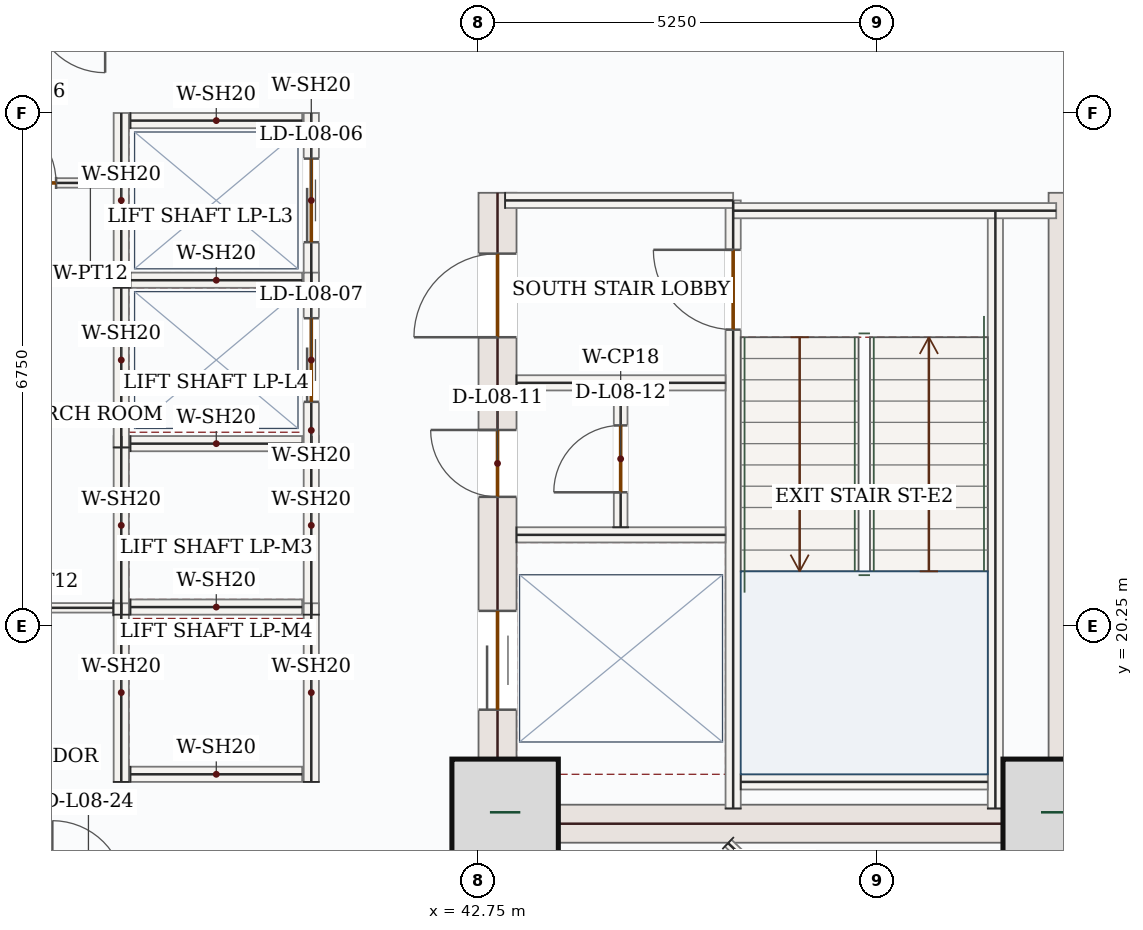
"""IFC4 building model, lengths in metres.
Left out: names, types, materials, properties, quantities, classifications, styles, units other than length and angle.
Written with IfcOpenShell. Run it as: python <this file> out.ifc"""

import sys

from ifc_helpers import new_model, si_unit, direction, frame, frame_2d, origin, origin_2d, place, context, subcontext, project, spatial, rectangle, extrude, source, transform, mapped, element, fill, save


model = new_model("IFC4")
c1 = context("Model", 3, precision=1e-05, world=origin(), true_north=direction((0.0, 1.0)))
c2 = subcontext(c1, "Body", "Model", "MODEL_VIEW")
j1 = project(units=[si_unit("LENGTHUNIT", "METRE"), si_unit("PLANEANGLEUNIT", "RADIAN")], contexts=[c1])
p1 = place(None, origin())
s1 = spatial("IfcSite", under=j1, at=p1, CompositionType="ELEMENT")
p2 = place(p1, origin())
s2 = spatial("IfcBuilding", under=s1, at=p2, CompositionType="ELEMENT")
p3 = place(p2, frame((0.0, 0.0, 41.7)))
s3 = spatial("IfcBuildingStorey", under=s2, at=p3, CompositionType="ELEMENT", Elevation=41.7)
p4 = place(p3, frame((43.0, 17.4, 0.0), z_axis=(0.0, 0.0, 1.0), x_axis=(0.0, 1.0, 0.0)))
e1 = element("IfcWall", 1, at=p4, inside=s3, PredefinedType="SHEAR", context=c2, shape_type="SweptSolid", body=[
    extrude(rectangle(XDim=8.55, YDim=0.5, at=frame_2d((4.275, 0.0))), origin(), (0.0, 0.0, 1.0), 3.95),
])
p5 = place(p4, frame((6.65, 0.0, 0.0)))
e2 = element("IfcOpeningElement", 2, at=p5, cuts=e1, PredefinedType="OPENING", context=c2, shape_type="SweptSolid", body=[
    extrude(rectangle(XDim=1.1, YDim=2.2, at=frame_2d((0.55, 1.1))), frame((0.0, 0.26, 0.0), z_axis=(0.0, -1.0, 0.0), x_axis=(1.0, 0.0, 0.0)), (0.0, 0.0, 1.0), 0.52),
])
p6 = place(p4, frame((1.75, 0.0, 0.0)))
e3 = element("IfcOpeningElement", 3, at=p6, cuts=e1, PredefinedType="OPENING", context=c2, shape_type="SweptSolid", body=[
    extrude(rectangle(XDim=1.3, YDim=2.2, at=frame_2d((0.65, 1.1))), frame((0.0, 0.26, 0.0), z_axis=(0.0, -1.0, 0.0), x_axis=(1.0, 0.0, 0.0)), (0.0, 0.0, 1.0), 0.52),
])
p7 = place(p4, frame((4.55, 0.0, 0.0)))
e4 = element("IfcOpeningElement", 4, at=p7, cuts=e1, PredefinedType="OPENING", context=c2, shape_type="SweptSolid", body=[
    extrude(rectangle(XDim=0.88, YDim=2.1, at=frame_2d((0.44, 1.05))), frame((0.0, 0.26, 0.0), z_axis=(0.0, -1.0, 0.0), x_axis=(1.0, 0.0, 0.0)), (0.0, 0.0, 1.0), 0.52),
])
m1 = source(origin(), c2, "Body", "SweptSolid", [
    extrude(rectangle(XDim=8.55, YDim=0.5, at=frame_2d((4.275, 0.0))), origin(), (0.0, 0.0, 1.0), 3.95),
])
p8 = place(p3, frame((50.5, 17.4, 0.0), z_axis=(0.0, 0.0, 1.0), x_axis=(0.0, 1.0, 0.0)))
e5 = element("IfcWall", 5, at=p8, inside=s3, PredefinedType="SHEAR", context=c2, shape_type="MappedRepresentation", body=[
    mapped(m1, transform((0.0, 0.0, 0.0), x_axis=(1.0, 0.0, 0.0), y_axis=(0.0, 1.0, 0.0), z_axis=(0.0, 0.0, 1.0), scale=1.0)),
])
m2 = source(origin(), c2, "Body", "SweptSolid", [
    extrude(rectangle(XDim=7.0, YDim=0.5, at=frame_2d((3.5, 0.0))), origin(), (0.0, 0.0, 1.0), 3.95),
])
p9 = place(p3, frame((43.25, 17.65, 0.0), z_axis=(0.0, 0.0, 1.0), x_axis=(1.0, 0.0, 0.0)))
e6 = element("IfcWall", 6, at=p9, inside=s3, PredefinedType="SHEAR", context=c2, shape_type="MappedRepresentation", body=[
    mapped(m2, transform((0.0, 0.0, 0.0), x_axis=(1.0, 0.0, 0.0), y_axis=(0.0, 1.0, 0.0), z_axis=(0.0, 0.0, 1.0), scale=1.0)),
])
m3 = source(origin(), c2, "Body", "SweptSolid", [
    extrude(rectangle(XDim=1.4, YDim=1.4, at=origin_2d()), origin(), (0.0, 0.0, 1.0), 4.2),
])
for number, where, z_axis, x_axis in (
    (7, (43.1, 17.8, 0.0), (0.0, 0.0, 1.0), (1.0, 0.0, 0.0)),
    (8, (50.35, 17.8, 0.0), (0.0, 0.0, 1.0), (1.0, 0.0, 0.0)),
):
    element("IfcColumn", number, at=place(p3, frame(where, z_axis=z_axis, x_axis=x_axis)), inside=s3, PredefinedType="COLUMN", context=c2, shape_type="MappedRepresentation", body=[
        mapped(m3, transform((0.0, 0.0, 0.0), x_axis=(1.0, 0.0, 0.0), y_axis=(0.0, 1.0, 0.0), z_axis=(0.0, 0.0, 1.0), scale=1.0)),
    ])
p10 = place(p3, frame((53.06, 18.458, 0.0), z_axis=(0.0, 0.0, 1.0), x_axis=(-0.707106781187, -0.707106781187, 0.0)))
e9 = element("IfcWall", 9, at=p10, inside=s3, PredefinedType="SOLIDWALL", context=c2, shape_type="SweptSolid", body=[
    extrude(rectangle(XDim=5.258, YDim=0.32, at=frame_2d((2.629, 0.0))), origin(), (0.0, 0.0, 1.0), 3.95),
])
p11 = place(p10, frame((1.429, 0.0, 0.85)))
e10 = element("IfcOpeningElement", 10, at=p11, cuts=e9, PredefinedType="OPENING", context=c2, shape_type="SweptSolid", body=[
    extrude(rectangle(XDim=2.4, YDim=1.8, at=frame_2d((1.2, 0.9))), frame((0.0, 0.17, 0.0), z_axis=(0.0, -1.0, 0.0), x_axis=(1.0, 0.0, 0.0)), (0.0, 0.0, 1.0), 0.34),
])
m4 = source(origin(), c2, "Body", "SweptSolid", [
    extrude(rectangle(XDim=7.87, YDim=0.2, at=frame_2d((3.935, 0.0))), origin(), (0.0, 0.0, 1.0), 3.95),
])
p12 = place(p3, frame((49.55, 17.85, 0.0), z_axis=(0.0, 0.0, 1.0), x_axis=(0.0, 1.0, 0.0)))
e11 = element("IfcWall", 11, at=p12, inside=s3, PredefinedType="SOLIDWALL", context=c2, shape_type="MappedRepresentation", body=[
    mapped(m4, transform((0.0, 0.0, 0.0), x_axis=(1.0, 0.0, 0.0), y_axis=(0.0, 1.0, 0.0), z_axis=(0.0, 0.0, 1.0), scale=1.0)),
])
p13 = place(p3, frame((46.1, 17.85, 0.0), z_axis=(0.0, 0.0, 1.0), x_axis=(0.0, 1.0, 0.0)))
e12 = element("IfcWall", 12, at=p13, inside=s3, PredefinedType="SOLIDWALL", context=c2, shape_type="SweptSolid", body=[
    extrude(rectangle(XDim=8.0, YDim=0.2, at=frame_2d((4.0, 0.0))), origin(), (0.0, 0.0, 1.0), 3.95),
])
p14 = place(p13, frame((6.3, 0.0, 0.0)))
e13 = element("IfcOpeningElement", 13, at=p14, cuts=e12, PredefinedType="OPENING", context=c2, shape_type="SweptSolid", body=[
    extrude(rectangle(XDim=1.05, YDim=2.15, at=frame_2d((0.525, 1.075))), frame((0.0, 0.11, 0.0), z_axis=(0.0, -1.0, 0.0), x_axis=(1.0, 0.0, 0.0)), (0.0, 0.0, 1.0), 0.22),
])
m5 = source(origin(), c2, "Body", "SweptSolid", [
    extrude(rectangle(XDim=3.0, YDim=0.2, at=frame_2d((1.5, 0.0))), origin(), (0.0, 0.0, 1.0), 3.95),
])
p15 = place(p3, frame((43.1, 25.85, 0.0), z_axis=(0.0, 0.0, 1.0), x_axis=(1.0, 0.0, 0.0)))
e14 = element("IfcWall", 14, at=p15, inside=s3, PredefinedType="SOLIDWALL", context=c2, shape_type="MappedRepresentation", body=[
    mapped(m5, transform((0.0, 0.0, 0.0), x_axis=(1.0, 0.0, 0.0), y_axis=(0.0, 1.0, 0.0), z_axis=(0.0, 0.0, 1.0), scale=1.0)),
])
m6 = source(origin(), c2, "Body", "SweptSolid", [
    extrude(rectangle(XDim=4.25, YDim=0.2, at=frame_2d((2.125, 0.0))), origin(), (0.0, 0.0, 1.0), 3.95),
])
p16 = place(p3, frame((46.1, 25.715, 0.0), z_axis=(0.0, 0.0, 1.0), x_axis=(1.0, 0.0, 0.0)))
e15 = element("IfcWall", 15, at=p16, inside=s3, PredefinedType="SOLIDWALL", context=c2, shape_type="MappedRepresentation", body=[
    mapped(m6, transform((0.0, 0.0, 0.0), x_axis=(1.0, 0.0, 0.0), y_axis=(0.0, 1.0, 0.0), z_axis=(0.0, 0.0, 1.0), scale=1.0)),
])
m7 = source(origin(), c2, "Body", "SweptSolid", [
    extrude(rectangle(XDim=3.25, YDim=0.2, at=frame_2d((1.625, 0.0))), origin(), (0.0, 0.0, 1.0), 3.95),
])
p17 = place(p3, frame((46.2, 18.2, 0.0), z_axis=(0.0, 0.0, 1.0), x_axis=(1.0, 0.0, 0.0)))
e16 = element("IfcWall", 16, at=p17, inside=s3, PredefinedType="SOLIDWALL", context=c2, shape_type="MappedRepresentation", body=[
    mapped(m7, transform((0.0, 0.0, 0.0), x_axis=(1.0, 0.0, 0.0), y_axis=(0.0, 1.0, 0.0), z_axis=(0.0, 0.0, 1.0), scale=1.0)),
])
m8 = source(origin(), c2, "Body", "SweptSolid", [
    extrude(rectangle(XDim=2.75, YDim=0.2, at=frame_2d((1.375, 0.0))), origin(), (0.0, 0.0, 1.0), 3.95),
])
for number, where, z_axis, x_axis in (
    (17, (43.25, 23.45, 0.0), (0.0, 0.0, 1.0), (1.0, 0.0, 0.0)),
    (18, (43.25, 21.45, 0.0), (0.0, 0.0, 1.0), (1.0, 0.0, 0.0)),
):
    element("IfcWall", number, at=place(p3, frame(where, z_axis=z_axis, x_axis=x_axis)), inside=s3, PredefinedType="SOLIDWALL", context=c2, shape_type="MappedRepresentation", body=[
        mapped(m8, transform((0.0, 0.0, 0.0), x_axis=(1.0, 0.0, 0.0), y_axis=(0.0, 1.0, 0.0), z_axis=(0.0, 0.0, 1.0), scale=1.0)),
    ])
p18 = place(p3, frame((44.62, 21.55, 0.0), z_axis=(0.0, 0.0, 1.0), x_axis=(0.0, 1.0, 0.0)))
e19 = element("IfcWall", 19, at=p18, inside=s3, PredefinedType="PARTITIONING", context=c2, shape_type="SweptSolid", body=[
    extrude(rectangle(XDim=1.8, YDim=0.18, at=frame_2d((0.9, 0.0))), origin(), (0.0, 0.0, 1.0), 3.95),
])
p19 = place(p18, frame((0.46, 0.0, 0.0)))
e20 = element("IfcOpeningElement", 20, at=p19, cuts=e19, PredefinedType="OPENING", context=c2, shape_type="SweptSolid", body=[
    extrude(rectangle(XDim=0.88, YDim=2.1, at=frame_2d((0.44, 1.05))), frame((0.0, 0.1, 0.0), z_axis=(0.0, -1.0, 0.0), x_axis=(1.0, 0.0, 0.0)), (0.0, 0.0, 1.0), 0.2),
])
m9 = source(origin(), c2, "Body", "SweptSolid", [
    extrude(rectangle(XDim=2.35, YDim=0.2, at=frame_2d((1.175, 0.0))), origin(), (0.0, 0.0, 1.0), 3.95),
])
for number, where, z_axis, x_axis in (
    (21, (38.05, 20.4, 0.0), (0.0, 0.0, 1.0), (0.0, 1.0, 0.0)),
    (22, (40.55, 20.4, 0.0), (0.0, 0.0, 1.0), (0.0, 1.0, 0.0)),
):
    element("IfcWall", number, at=place(p3, frame(where, z_axis=z_axis, x_axis=x_axis)), inside=s3, PredefinedType="SOLIDWALL", context=c2, shape_type="MappedRepresentation", body=[
        mapped(m9, transform((0.0, 0.0, 0.0), x_axis=(1.0, 0.0, 0.0), y_axis=(0.0, 1.0, 0.0), z_axis=(0.0, 0.0, 1.0), scale=1.0)),
    ])
m10 = source(origin(), c2, "Body", "SweptSolid", [
    extrude(rectangle(XDim=2.26, YDim=0.2, at=frame_2d((1.13, 0.0))), origin(), (0.0, 0.0, 1.0), 3.95),
])
for number, where, z_axis, x_axis in (
    (23, (38.17, 20.5, 0.0), (0.0, 0.0, 1.0), (1.0, 0.0, 0.0)),
    (24, (38.17, 22.65, 0.0), (0.0, 0.0, 1.0), (1.0, 0.0, 0.0)),
):
    element("IfcWall", number, at=place(p3, frame(where, z_axis=z_axis, x_axis=x_axis)), inside=s3, PredefinedType="SOLIDWALL", context=c2, shape_type="MappedRepresentation", body=[
        mapped(m10, transform((0.0, 0.0, 0.0), x_axis=(1.0, 0.0, 0.0), y_axis=(0.0, 1.0, 0.0), z_axis=(0.0, 0.0, 1.0), scale=1.0)),
    ])
for number, where, z_axis, x_axis in (
    (25, (38.05, 18.2, 0.0), (0.0, 0.0, 1.0), (0.0, 1.0, 0.0)),
    (26, (40.55, 18.2, 0.0), (0.0, 0.0, 1.0), (0.0, 1.0, 0.0)),
):
    element("IfcWall", number, at=place(p3, frame(where, z_axis=z_axis, x_axis=x_axis)), inside=s3, PredefinedType="SOLIDWALL", context=c2, shape_type="MappedRepresentation", body=[
        mapped(m9, transform((0.0, 0.0, 0.0), x_axis=(1.0, 0.0, 0.0), y_axis=(0.0, 1.0, 0.0), z_axis=(0.0, 0.0, 1.0), scale=1.0)),
    ])
p20 = place(p3, frame((38.17, 18.3, 0.0), z_axis=(0.0, 0.0, 1.0), x_axis=(1.0, 0.0, 0.0)))
e27 = element("IfcWall", 27, at=p20, inside=s3, PredefinedType="SOLIDWALL", context=c2, shape_type="MappedRepresentation", body=[
    mapped(m10, transform((0.0, 0.0, 0.0), x_axis=(1.0, 0.0, 0.0), y_axis=(0.0, 1.0, 0.0), z_axis=(0.0, 0.0, 1.0), scale=1.0)),
])
m11 = source(origin(), c2, "Body", "SweptSolid", [
    extrude(rectangle(XDim=2.3, YDim=0.2, at=frame_2d((1.15, 0.0))), origin(), (0.0, 0.0, 1.0), 3.95),
])
p21 = place(p3, frame((38.05, 24.7, 0.0), z_axis=(0.0, 0.0, 1.0), x_axis=(0.0, 1.0, 0.0)))
e28 = element("IfcWall", 28, at=p21, inside=s3, PredefinedType="SOLIDWALL", context=c2, shape_type="MappedRepresentation", body=[
    mapped(m11, transform((0.0, 0.0, 0.0), x_axis=(1.0, 0.0, 0.0), y_axis=(0.0, 1.0, 0.0), z_axis=(0.0, 0.0, 1.0), scale=1.0)),
])
p22 = place(p3, frame((40.55, 24.7, 0.0), z_axis=(0.0, 0.0, 1.0), x_axis=(0.0, 1.0, 0.0)))
e29 = element("IfcWall", 29, at=p22, inside=s3, PredefinedType="SOLIDWALL", context=c2, shape_type="SweptSolid", body=[
    extrude(rectangle(XDim=2.3, YDim=0.2, at=frame_2d((1.15, 0.0))), origin(), (0.0, 0.0, 1.0), 3.95),
])
p23 = place(p22, frame((0.6, 0.0, 0.0)))
e30 = element("IfcOpeningElement", 30, at=p23, cuts=e29, PredefinedType="OPENING", context=c2, shape_type="SweptSolid", body=[
    extrude(rectangle(XDim=1.1, YDim=2.15, at=frame_2d((0.55, 1.075))), frame((0.0, 0.11, 0.0), z_axis=(0.0, -1.0, 0.0), x_axis=(1.0, 0.0, 0.0)), (0.0, 0.0, 1.0), 0.22),
])
for number, where, z_axis, x_axis in (
    (31, (38.17, 24.8, 0.0), (0.0, 0.0, 1.0), (1.0, 0.0, 0.0)),
    (32, (38.17, 26.9, 0.0), (0.0, 0.0, 1.0), (1.0, 0.0, 0.0)),
):
    element("IfcWall", number, at=place(p3, frame(where, z_axis=z_axis, x_axis=x_axis)), inside=s3, PredefinedType="SOLIDWALL", context=c2, shape_type="MappedRepresentation", body=[
        mapped(m10, transform((0.0, 0.0, 0.0), x_axis=(1.0, 0.0, 0.0), y_axis=(0.0, 1.0, 0.0), z_axis=(0.0, 0.0, 1.0), scale=1.0)),
    ])
m12 = source(origin(), c2, "Body", "SweptSolid", [
    extrude(rectangle(XDim=2.3, YDim=0.2, at=frame_2d((1.15, 0.0))), origin(), (0.0, 0.0, 1.0), 3.95),
])
p24 = place(p3, frame((38.05, 22.6, 0.0), z_axis=(0.0, 0.0, 1.0), x_axis=(0.0, 1.0, 0.0)))
e33 = element("IfcWall", 33, at=p24, inside=s3, PredefinedType="SOLIDWALL", context=c2, shape_type="MappedRepresentation", body=[
    mapped(m12, transform((0.0, 0.0, 0.0), x_axis=(1.0, 0.0, 0.0), y_axis=(0.0, 1.0, 0.0), z_axis=(0.0, 0.0, 1.0), scale=1.0)),
])
p25 = place(p3, frame((40.55, 22.6, 0.0), z_axis=(0.0, 0.0, 1.0), x_axis=(0.0, 1.0, 0.0)))
e34 = element("IfcWall", 34, at=p25, inside=s3, PredefinedType="SOLIDWALL", context=c2, shape_type="SweptSolid", body=[
    extrude(rectangle(XDim=2.3, YDim=0.2, at=frame_2d((1.15, 0.0))), origin(), (0.0, 0.0, 1.0), 3.95),
])
p26 = place(p25, frame((0.6, 0.0, 0.0)))
e35 = element("IfcOpeningElement", 35, at=p26, cuts=e34, PredefinedType="OPENING", context=c2, shape_type="SweptSolid", body=[
    extrude(rectangle(XDim=1.1, YDim=2.15, at=frame_2d((0.55, 1.075))), frame((0.0, 0.11, 0.0), z_axis=(0.0, -1.0, 0.0), x_axis=(1.0, 0.0, 0.0)), (0.0, 0.0, 1.0), 0.22),
])
p27 = place(p3, frame((36.03, 26.08, 0.0), z_axis=(0.0, 0.0, 1.0), x_axis=(1.0, 0.0, 0.0)))
e36 = element("IfcWall", 36, at=p27, inside=s3, PredefinedType="PARTITIONING", context=c2, shape_type="SweptSolid", body=[
    extrude(rectangle(XDim=1.915, YDim=0.125, at=frame_2d((0.958, 0.0))), origin(), (0.0, 0.0, 1.0), 3.95),
])
p28 = place(p27, frame((0.212, 0.0, 0.0)))
e37 = element("IfcOpeningElement", 37, at=p28, cuts=e36, PredefinedType="OPENING", context=c2, shape_type="SweptSolid", body=[
    extrude(rectangle(XDim=0.95, YDim=2.15, at=frame_2d((0.475, 1.075))), frame((0.0, 0.073, 0.0), z_axis=(0.0, -1.0, 0.0), x_axis=(1.0, 0.0, 0.0)), (0.0, 0.0, 1.0), 0.145),
])
m13 = source(origin(), c2, "Body", "SweptSolid", [
    extrude(rectangle(XDim=1.907, YDim=0.125, at=frame_2d((0.954, 0.0))), origin(), (0.0, 0.0, 1.0), 3.95),
])
p29 = place(p3, frame((37.945, 20.49, 0.0), z_axis=(0.0, 0.0, 1.0), x_axis=(-1.0, 0.0, 0.0)))
e38 = element("IfcWall", 38, at=p29, inside=s3, PredefinedType="PARTITIONING", context=c2, shape_type="MappedRepresentation", body=[
    mapped(m13, transform((0.0, 0.0, 0.0), x_axis=(1.0, 0.0, 0.0), y_axis=(0.0, 1.0, 0.0), z_axis=(0.0, 0.0, 1.0), scale=1.0)),
])
m14 = source(origin(), c2, "Body", "SweptSolid", [
    extrude(rectangle(XDim=1.715, YDim=0.125, at=frame_2d((0.857, 0.0))), origin(), (0.0, 0.0, 1.0), 3.95),
])
p30 = place(p3, frame((46.034, 17.395, 0.0), z_axis=(0.0, 0.0, 1.0), x_axis=(0.724259786069, -0.689527201989, 0.0)))
e39 = element("IfcWall", 39, at=p30, inside=s3, PredefinedType="PARTITIONING", context=c2, shape_type="MappedRepresentation", body=[
    mapped(m14, transform((0.0, 0.0, 0.0), x_axis=(1.0, 0.0, 0.0), y_axis=(0.0, 1.0, 0.0), z_axis=(0.0, 0.0, 1.0), scale=1.0)),
])
m15 = source(origin(), c2, "Body", "SweptSolid", [
    extrude(rectangle(XDim=2.4, YDim=1.8, at=frame_2d((1.2, 0.9))), frame((0.0, 0.03, 0.0), z_axis=(0.0, -1.0, 0.0), x_axis=(1.0, 0.0, 0.0)), (0.0, 0.0, 1.0), 0.06),
])
p31 = place(p11, origin())
e40 = element("IfcWindow", 40, at=p31, inside=s3, PartitioningType="DOUBLE_PANEL_VERTICAL", PredefinedType="WINDOW", context=c2, shape_type="MappedRepresentation", body=[
    mapped(m15, transform((0.0, 0.0, 0.0), x_axis=(1.0, 0.0, 0.0), y_axis=(0.0, 1.0, 0.0), z_axis=(0.0, 0.0, 1.0), scale=1.0)),
])
fill(e10, e40)
m16 = source(origin(), c2, "Body", "SweptSolid", [
    extrude(rectangle(XDim=1.05, YDim=2.15, at=frame_2d((0.525, 1.075))), frame((0.0, 0.025, 0.0), z_axis=(0.0, -1.0, 0.0), x_axis=(1.0, 0.0, 0.0)), (0.0, 0.0, 1.0), 0.05),
])
p32 = place(p14, origin())
e41 = element("IfcDoor", 41, at=p32, inside=s3, OperationType="SINGLE_SWING_RIGHT", PredefinedType="DOOR", context=c2, shape_type="MappedRepresentation", body=[
    mapped(m16, transform((0.0, 0.0, 0.0), x_axis=(1.0, 0.0, 0.0), y_axis=(0.0, 1.0, 0.0), z_axis=(0.0, 0.0, 1.0), scale=1.0)),
])
fill(e13, e41)
m17 = source(origin(), c2, "Body", "SweptSolid", [
    extrude(rectangle(XDim=1.1, YDim=2.2, at=frame_2d((0.55, 1.1))), frame((0.0, 0.025, 0.0), z_axis=(0.0, -1.0, 0.0), x_axis=(1.0, 0.0, 0.0)), (0.0, 0.0, 1.0), 0.05),
])
p33 = place(p5, origin())
e42 = element("IfcDoor", 42, at=p33, inside=s3, OperationType="SINGLE_SWING_LEFT", PredefinedType="DOOR", context=c2, shape_type="MappedRepresentation", body=[
    mapped(m17, transform((0.0, 0.0, 0.0), x_axis=(1.0, 0.0, 0.0), y_axis=(0.0, 1.0, 0.0), z_axis=(0.0, 0.0, 1.0), scale=1.0)),
])
fill(e2, e42)
m18 = source(origin(), c2, "Body", "SweptSolid", [
    extrude(rectangle(XDim=1.3, YDim=2.2, at=frame_2d((0.65, 1.1))), frame((0.0, 0.025, 0.0), z_axis=(0.0, -1.0, 0.0), x_axis=(1.0, 0.0, 0.0)), (0.0, 0.0, 1.0), 0.05),
])
p34 = place(p6, origin())
e43 = element("IfcDoor", 43, at=p34, inside=s3, OperationType="DOUBLE_DOOR_SLIDING", PredefinedType="DOOR", context=c2, shape_type="MappedRepresentation", body=[
    mapped(m18, transform((0.0, 0.0, 0.0), x_axis=(1.0, 0.0, 0.0), y_axis=(0.0, 1.0, 0.0), z_axis=(0.0, 0.0, 1.0), scale=1.0)),
])
fill(e3, e43)
m19 = source(origin(), c2, "Body", "SweptSolid", [
    extrude(rectangle(XDim=0.88, YDim=2.1, at=frame_2d((0.44, 1.05))), frame((0.0, 0.025, 0.0), z_axis=(0.0, -1.0, 0.0), x_axis=(1.0, 0.0, 0.0)), (0.0, 0.0, 1.0), 0.05),
])
p35 = place(p7, origin())
e44 = element("IfcDoor", 44, at=p35, inside=s3, OperationType="SINGLE_SWING_RIGHT", PredefinedType="DOOR", context=c2, shape_type="MappedRepresentation", body=[
    mapped(m19, transform((0.0, 0.0, 0.0), x_axis=(1.0, 0.0, 0.0), y_axis=(0.0, 1.0, 0.0), z_axis=(0.0, 0.0, 1.0), scale=1.0)),
])
fill(e4, e44)
p36 = place(p19, origin())
e45 = element("IfcDoor", 45, at=p36, inside=s3, OperationType="SINGLE_SWING_LEFT", PredefinedType="DOOR", context=c2, shape_type="MappedRepresentation", body=[
    mapped(m19, transform((0.0, 0.0, 0.0), x_axis=(1.0, 0.0, 0.0), y_axis=(0.0, 1.0, 0.0), z_axis=(0.0, 0.0, 1.0), scale=1.0)),
])
fill(e20, e45)
m20 = source(origin(), c2, "Body", "SweptSolid", [
    extrude(rectangle(XDim=1.1, YDim=2.15, at=frame_2d((0.55, 1.075))), frame((0.0, 0.025, 0.0), z_axis=(0.0, -1.0, 0.0), x_axis=(1.0, 0.0, 0.0)), (0.0, 0.0, 1.0), 0.05),
])
p37 = place(p23, origin())
e46 = element("IfcDoor", 46, at=p37, inside=s3, OperationType="DOUBLE_DOOR_SLIDING", PredefinedType="DOOR", context=c2, shape_type="MappedRepresentation", body=[
    mapped(m20, transform((0.0, 0.0, 0.0), x_axis=(1.0, 0.0, 0.0), y_axis=(0.0, 1.0, 0.0), z_axis=(0.0, 0.0, 1.0), scale=1.0)),
])
fill(e30, e46)
p38 = place(p26, origin())
e47 = element("IfcDoor", 47, at=p38, inside=s3, OperationType="DOUBLE_DOOR_SLIDING", PredefinedType="DOOR", context=c2, shape_type="MappedRepresentation", body=[
    mapped(m20, transform((0.0, 0.0, 0.0), x_axis=(1.0, 0.0, 0.0), y_axis=(0.0, 1.0, 0.0), z_axis=(0.0, 0.0, 1.0), scale=1.0)),
])
fill(e35, e47)
m21 = source(origin(), c2, "Body", "SweptSolid", [
    extrude(rectangle(XDim=0.95, YDim=2.15, at=frame_2d((0.475, 1.075))), frame((0.0, 0.025, 0.0), z_axis=(0.0, -1.0, 0.0), x_axis=(1.0, 0.0, 0.0)), (0.0, 0.0, 1.0), 0.05),
])
p39 = place(p28, origin())
e48 = element("IfcDoor", 48, at=p39, inside=s3, OperationType="SINGLE_SWING_LEFT", PredefinedType="DOOR", context=c2, shape_type="MappedRepresentation", body=[
    mapped(m21, transform((0.0, 0.0, 0.0), x_axis=(1.0, 0.0, 0.0), y_axis=(0.0, 1.0, 0.0), z_axis=(0.0, 0.0, 1.0), scale=1.0)),
])
fill(e37, e48)
save(model, sys.argv[1])
